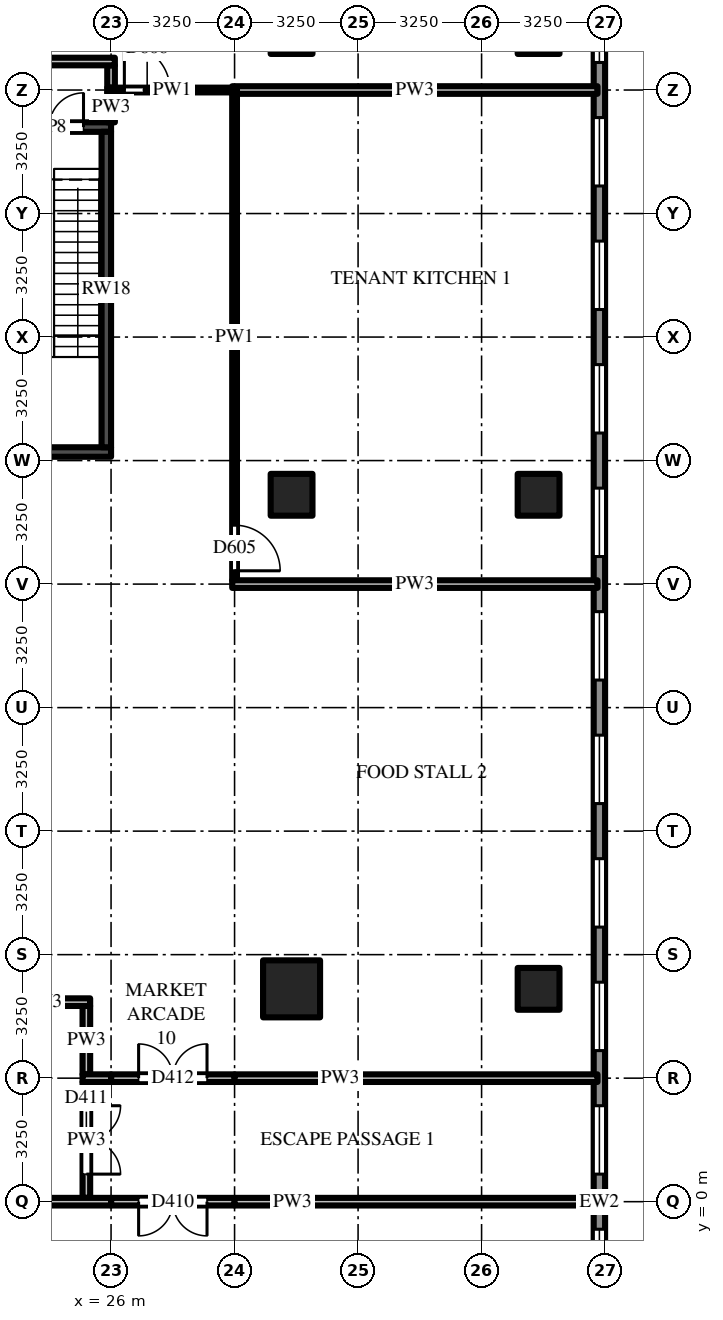
"""IFC4 building model, lengths in metres.
Left out: names, types, materials, properties, quantities, classifications, styles, units other than length and angle.
Written with IfcOpenShell. Run it as: python <this file> out.ifc"""

import sys

from ifc_helpers import new_model, si_unit, direction, frame, frame_2d, origin, origin_2d, place, context, subcontext, project, spatial, rectangle, extrude, source, transform, mapped, element, fill, save


model = new_model("IFC4")
c1 = context("Model", 3, precision=1e-05, world=origin(), true_north=direction((0.0, 1.0)))
c2 = subcontext(c1, "Body", "Model", "MODEL_VIEW")
j1 = project(units=[si_unit("LENGTHUNIT", "METRE"), si_unit("PLANEANGLEUNIT", "RADIAN")], contexts=[c1])
p1 = place(None, origin())
s1 = spatial("IfcSite", under=j1, at=p1, CompositionType="ELEMENT")
p2 = place(p1, origin())
s2 = spatial("IfcBuilding", under=s1, at=p2, CompositionType="ELEMENT")
p3 = place(p2, frame((0.0, 0.0, 19.0)))
s3 = spatial("IfcBuildingStorey", under=s2, at=p3, CompositionType="ELEMENT", Elevation=19.0)
m1 = source(origin(), c2, "Body", "SweptSolid", [
    extrude(rectangle(XDim=1.5, YDim=1.5, at=origin_2d()), origin(), (0.0, 0.0, 1.0), 5.0),
])
p4 = place(p3, frame((30.75, 5.6, 0.0), z_axis=(0.0, 0.0, 1.0), x_axis=(1.0, 0.0, 0.0)))
e1 = element("IfcColumn", 1, at=p4, inside=s3, PredefinedType="COLUMN", context=c2, shape_type="MappedRepresentation", body=[
    mapped(m1, transform((0.0, 0.0, 0.0))),
])
m2 = source(origin(), c2, "Body", "SweptSolid", [
    extrude(rectangle(XDim=1.1, YDim=1.1, at=origin_2d()), origin(), (0.0, 0.0, 1.0), 5.0),
])
for number, where, z_axis, x_axis in (
    (2, (30.75, 18.6, 0.0), (0.0, 0.0, 1.0), (1.0, 0.0, 0.0)),
    (3, (30.75, 30.75, 0.0), (0.0, 0.0, 1.0), (1.0, 0.0, 0.0)),
    (4, (37.25, 5.6, 0.0), (0.0, 0.0, 1.0), (1.0, 0.0, 0.0)),
    (5, (37.25, 18.6, 0.0), (0.0, 0.0, 1.0), (1.0, 0.0, 0.0)),
    (6, (37.25, 30.75, 0.0), (0.0, 0.0, 1.0), (1.0, 0.0, 0.0)),
):
    element("IfcColumn", number, at=place(p3, frame(where, z_axis=z_axis, x_axis=x_axis)), inside=s3, PredefinedType="COLUMN", context=c2, shape_type="MappedRepresentation", body=[
        mapped(m2, transform((0.0, 0.0, 0.0))),
    ])
m3 = source(origin(), c2, "Body", "SweptSolid", [
    extrude(rectangle(XDim=6.5, YDim=0.25, at=frame_2d((3.25, 0.0))), origin(), (0.0, 0.0, 1.0), 4.7),
])
p5 = place(p3, frame((19.5, 28.275, 0.0), z_axis=(0.0, 0.0, 1.0), x_axis=(1.0, 0.0, 0.0)))
e7 = element("IfcWall", 7, at=p5, inside=s3, PredefinedType="SHEAR", context=c2, shape_type="MappedRepresentation", body=[
    mapped(m3, transform((0.0, 0.0, 0.0))),
])
m4 = source(origin(), c2, "Body", "SweptSolid", [
    extrude(rectangle(XDim=1.8, YDim=2.1, at=frame_2d((0.9, 1.05))), frame((0.0, 0.135, 0.0), z_axis=(0.0, -1.0, 0.0), x_axis=(1.0, 0.0, 0.0)), (0.0, 0.0, 1.0), 0.27),
])
p6 = place(p5, frame((0.725, 0.0, 0.0)))
e8 = element("IfcOpeningElement", 8, at=p6, cuts=e7, PredefinedType="OPENING", context=c2, shape_type="MappedRepresentation", body=[
    mapped(m4, transform((0.0, 0.0, 0.0))),
])
p7 = place(p5, frame((3.975, 0.0, 0.0)))
e9 = element("IfcOpeningElement", 9, at=p7, cuts=e7, PredefinedType="OPENING", context=c2, shape_type="MappedRepresentation", body=[
    mapped(m4, transform((0.0, 0.0, 0.0))),
])
p8 = place(p3, frame((19.5, 19.725, 0.0), z_axis=(0.0, 0.0, 1.0), x_axis=(1.0, 0.0, 0.0)))
e10 = element("IfcWall", 10, at=p8, inside=s3, PredefinedType="SHEAR", context=c2, shape_type="MappedRepresentation", body=[
    mapped(m3, transform((0.0, 0.0, 0.0))),
])
m5 = source(origin(), c2, "Body", "SweptSolid", [
    extrude(rectangle(XDim=8.3, YDim=0.25, at=frame_2d((4.15, 0.0))), origin(), (0.0, 0.0, 1.0), 4.7),
])
p9 = place(p3, frame((25.875, 19.85, 0.0), z_axis=(0.0, 0.0, 1.0), x_axis=(0.0, 1.0, 0.0)))
e11 = element("IfcWall", 11, at=p9, inside=s3, PredefinedType="SHEAR", context=c2, shape_type="MappedRepresentation", body=[
    mapped(m5, transform((0.0, 0.0, 0.0))),
])
m6 = source(origin(), c2, "Body", "SweptSolid", [
    extrude(rectangle(XDim=71.5, YDim=0.3, at=frame_2d((35.75, 0.0))), origin(), (0.0, 0.0, 1.0), 4.7),
])
p10 = place(p3, frame((38.85, -35.75, 0.0), z_axis=(0.0, 0.0, 1.0), x_axis=(0.0, 1.0, 0.0)))
e12 = element("IfcWall", 12, at=p10, inside=s3, PredefinedType="SOLIDWALL", context=c2, shape_type="MappedRepresentation", body=[
    mapped(m6, transform((0.0, 0.0, 0.0))),
])
m7 = source(origin(), c2, "Body", "SweptSolid", [
    extrude(rectangle(XDim=1.8, YDim=3.0, at=frame_2d((0.9, 1.5))), frame((0.0, 0.16, 0.0), z_axis=(0.0, -1.0, 0.0), x_axis=(1.0, 0.0, 0.0)), (0.0, 0.0, 1.0), 0.32),
])
p11 = place(p10, frame((0.725, 0.0, 0.9)))
e13 = element("IfcOpeningElement", 13, at=p11, cuts=e12, PredefinedType="OPENING", context=c2, shape_type="MappedRepresentation", body=[
    mapped(m7, transform((0.0, 0.0, 0.0))),
])
p12 = place(p10, frame((3.975, 0.0, 0.9)))
e14 = element("IfcOpeningElement", 14, at=p12, cuts=e12, PredefinedType="OPENING", context=c2, shape_type="MappedRepresentation", body=[
    mapped(m7, transform((0.0, 0.0, 0.0))),
])
p13 = place(p10, frame((7.225, 0.0, 0.9)))
e15 = element("IfcOpeningElement", 15, at=p13, cuts=e12, PredefinedType="OPENING", context=c2, shape_type="MappedRepresentation", body=[
    mapped(m7, transform((0.0, 0.0, 0.0))),
])
p14 = place(p10, frame((10.475, 0.0, 0.9)))
e16 = element("IfcOpeningElement", 16, at=p14, cuts=e12, PredefinedType="OPENING", context=c2, shape_type="MappedRepresentation", body=[
    mapped(m7, transform((0.0, 0.0, 0.0))),
])
p15 = place(p10, frame((13.725, 0.0, 0.9)))
e17 = element("IfcOpeningElement", 17, at=p15, cuts=e12, PredefinedType="OPENING", context=c2, shape_type="MappedRepresentation", body=[
    mapped(m7, transform((0.0, 0.0, 0.0))),
])
p16 = place(p10, frame((16.975, 0.0, 0.9)))
e18 = element("IfcOpeningElement", 18, at=p16, cuts=e12, PredefinedType="OPENING", context=c2, shape_type="MappedRepresentation", body=[
    mapped(m7, transform((0.0, 0.0, 0.0))),
])
p17 = place(p10, frame((20.225, 0.0, 0.9)))
e19 = element("IfcOpeningElement", 19, at=p17, cuts=e12, PredefinedType="OPENING", context=c2, shape_type="MappedRepresentation", body=[
    mapped(m7, transform((0.0, 0.0, 0.0))),
])
p18 = place(p10, frame((23.475, 0.0, 0.9)))
e20 = element("IfcOpeningElement", 20, at=p18, cuts=e12, PredefinedType="OPENING", context=c2, shape_type="MappedRepresentation", body=[
    mapped(m7, transform((0.0, 0.0, 0.0))),
])
p19 = place(p10, frame((26.725, 0.0, 0.9)))
e21 = element("IfcOpeningElement", 21, at=p19, cuts=e12, PredefinedType="OPENING", context=c2, shape_type="MappedRepresentation", body=[
    mapped(m7, transform((0.0, 0.0, 0.0))),
])
p20 = place(p10, frame((29.975, 0.0, 0.9)))
e22 = element("IfcOpeningElement", 22, at=p20, cuts=e12, PredefinedType="OPENING", context=c2, shape_type="MappedRepresentation", body=[
    mapped(m7, transform((0.0, 0.0, 0.0))),
])
p21 = place(p10, frame((33.225, 0.0, 0.9)))
e23 = element("IfcOpeningElement", 23, at=p21, cuts=e12, PredefinedType="OPENING", context=c2, shape_type="MappedRepresentation", body=[
    mapped(m7, transform((0.0, 0.0, 0.0))),
])
p22 = place(p10, frame((36.475, 0.0, 0.9)))
e24 = element("IfcOpeningElement", 24, at=p22, cuts=e12, PredefinedType="OPENING", context=c2, shape_type="MappedRepresentation", body=[
    mapped(m7, transform((0.0, 0.0, 0.0))),
])
p23 = place(p10, frame((39.725, 0.0, 0.9)))
e25 = element("IfcOpeningElement", 25, at=p23, cuts=e12, PredefinedType="OPENING", context=c2, shape_type="MappedRepresentation", body=[
    mapped(m7, transform((0.0, 0.0, 0.0))),
])
p24 = place(p10, frame((42.975, 0.0, 0.9)))
e26 = element("IfcOpeningElement", 26, at=p24, cuts=e12, PredefinedType="OPENING", context=c2, shape_type="MappedRepresentation", body=[
    mapped(m7, transform((0.0, 0.0, 0.0))),
])
p25 = place(p10, frame((46.225, 0.0, 0.9)))
e27 = element("IfcOpeningElement", 27, at=p25, cuts=e12, PredefinedType="OPENING", context=c2, shape_type="MappedRepresentation", body=[
    mapped(m7, transform((0.0, 0.0, 0.0))),
])
p26 = place(p10, frame((49.475, 0.0, 0.9)))
e28 = element("IfcOpeningElement", 28, at=p26, cuts=e12, PredefinedType="OPENING", context=c2, shape_type="MappedRepresentation", body=[
    mapped(m7, transform((0.0, 0.0, 0.0))),
])
p27 = place(p10, frame((52.725, 0.0, 0.9)))
e29 = element("IfcOpeningElement", 29, at=p27, cuts=e12, PredefinedType="OPENING", context=c2, shape_type="MappedRepresentation", body=[
    mapped(m7, transform((0.0, 0.0, 0.0))),
])
p28 = place(p10, frame((55.975, 0.0, 0.9)))
e30 = element("IfcOpeningElement", 30, at=p28, cuts=e12, PredefinedType="OPENING", context=c2, shape_type="MappedRepresentation", body=[
    mapped(m7, transform((0.0, 0.0, 0.0))),
])
p29 = place(p10, frame((59.225, 0.0, 0.9)))
e31 = element("IfcOpeningElement", 31, at=p29, cuts=e12, PredefinedType="OPENING", context=c2, shape_type="MappedRepresentation", body=[
    mapped(m7, transform((0.0, 0.0, 0.0))),
])
p30 = place(p10, frame((62.475, 0.0, 0.9)))
e32 = element("IfcOpeningElement", 32, at=p30, cuts=e12, PredefinedType="OPENING", context=c2, shape_type="MappedRepresentation", body=[
    mapped(m7, transform((0.0, 0.0, 0.0))),
])
p31 = place(p10, frame((65.725, 0.0, 0.9)))
e33 = element("IfcOpeningElement", 33, at=p31, cuts=e12, PredefinedType="OPENING", context=c2, shape_type="MappedRepresentation", body=[
    mapped(m7, transform((0.0, 0.0, 0.0))),
])
p32 = place(p10, frame((68.975, 0.0, 0.9)))
e34 = element("IfcOpeningElement", 34, at=p32, cuts=e12, PredefinedType="OPENING", context=c2, shape_type="MappedRepresentation", body=[
    mapped(m7, transform((0.0, 0.0, 0.0))),
])
m8 = source(origin(), c2, "Body", "SweptSolid", [
    extrude(rectangle(XDim=3.05, YDim=0.2, at=frame_2d((1.525, 0.0))), origin(), (0.0, 0.0, 1.0), 4.077),
])
p33 = place(p3, frame((25.35, 3.15, 0.0), z_axis=(0.0, 0.0, 1.0), x_axis=(0.0, -1.0, 0.0)))
e35 = element("IfcWall", 35, at=p33, inside=s3, PredefinedType="PARTITIONING", context=c2, shape_type="MappedRepresentation", body=[
    mapped(m8, transform((0.0, 0.0, 0.0))),
])
m9 = source(origin(), c2, "Body", "SweptSolid", [
    extrude(rectangle(XDim=1.8, YDim=2.1, at=frame_2d((0.9, 1.05))), frame((0.0, 0.11, 0.0), z_axis=(0.0, -1.0, 0.0), x_axis=(1.0, 0.0, 0.0)), (0.0, 0.0, 1.0), 0.22),
])
p34 = place(p33, frame((0.625, 0.0, 0.0)))
e36 = element("IfcOpeningElement", 36, at=p34, cuts=e35, PredefinedType="OPENING", context=c2, shape_type="MappedRepresentation", body=[
    mapped(m9, transform((0.0, 0.0, 0.0))),
])
m10 = source(origin(), c2, "Body", "SweptSolid", [
    extrude(rectangle(XDim=1.8, YDim=0.2, at=frame_2d((0.9, 0.0))), origin(), (0.0, 0.0, 1.0), 4.7),
])
p35 = place(p3, frame((25.35, 3.35, 0.0), z_axis=(0.0, 0.0, 1.0), x_axis=(0.0, 1.0, 0.0)))
e37 = element("IfcWall", 37, at=p35, inside=s3, PredefinedType="PARTITIONING", context=c2, shape_type="MappedRepresentation", body=[
    mapped(m10, transform((0.0, 0.0, 0.0))),
])
m11 = source(origin(), c2, "Body", "SweptSolid", [
    extrude(rectangle(XDim=0.788, YDim=0.2, at=frame_2d((0.394, 0.0))), origin(), (0.0, 0.0, 1.0), 4.7),
])
p36 = place(p3, frame((26.0, 28.4, 0.0), z_axis=(0.0, 0.0, 1.0), x_axis=(0.0, 1.0, 0.0)))
e38 = element("IfcWall", 38, at=p36, inside=s3, PredefinedType="PARTITIONING", context=c2, shape_type="MappedRepresentation", body=[
    mapped(m11, transform((0.0, 0.0, 0.0))),
])
m12 = source(origin(), c2, "Body", "SweptSolid", [
    extrude(rectangle(XDim=0.587, YDim=0.2, at=frame_2d((0.294, 0.0))), origin(), (0.0, 0.0, 1.0), 4.7),
])
p37 = place(p3, frame((26.0, 29.9, 0.0), z_axis=(0.0, 0.0, 1.0), x_axis=(0.0, -1.0, 0.0)))
e39 = element("IfcWall", 39, at=p37, inside=s3, PredefinedType="PARTITIONING", context=c2, shape_type="MappedRepresentation", body=[
    mapped(m12, transform((0.0, 0.0, 0.0))),
])
m13 = source(origin(), c2, "Body", "SweptSolid", [
    extrude(rectangle(XDim=12.8, YDim=0.125, at=frame_2d((6.4, 0.0))), origin(), (0.0, 0.0, 1.0), 3.762),
])
p38 = place(p3, frame((29.25, 29.15, 0.0), z_axis=(0.0, 0.0, 1.0), x_axis=(0.0, -1.0, 0.0)))
e40 = element("IfcWall", 40, at=p38, inside=s3, PredefinedType="PARTITIONING", context=c2, shape_type="MappedRepresentation", body=[
    mapped(m13, transform((0.0, 0.0, 0.0))),
])
m14 = source(origin(), c2, "Body", "SweptSolid", [
    extrude(rectangle(XDim=1.2, YDim=2.1, at=frame_2d((0.6, 1.05))), frame((0.0, 0.073, 0.0), z_axis=(0.0, -1.0, 0.0), x_axis=(1.0, 0.0, 0.0)), (0.0, 0.0, 1.0), 0.145),
])
p39 = place(p38, frame((11.35, 0.0, 0.0)))
e41 = element("IfcOpeningElement", 41, at=p39, cuts=e40, PredefinedType="OPENING", context=c2, shape_type="MappedRepresentation", body=[
    mapped(m14, transform((0.0, 0.0, 0.0))),
])
m15 = source(origin(), c2, "Body", "SweptSolid", [
    extrude(rectangle(XDim=3.25, YDim=0.2, at=frame_2d((1.625, 0.0))), origin(), (0.0, 0.0, 1.0), 4.077),
])
p40 = place(p3, frame((29.25, 0.0, 0.0), z_axis=(0.0, 0.0, 1.0), x_axis=(-1.0, 0.0, 0.0)))
e42 = element("IfcWall", 42, at=p40, inside=s3, PredefinedType="PARTITIONING", context=c2, shape_type="MappedRepresentation", body=[
    mapped(m15, transform((0.0, 0.0, 0.0))),
])
p41 = place(p40, frame((0.725, 0.0, 0.0)))
e43 = element("IfcOpeningElement", 43, at=p41, cuts=e42, PredefinedType="OPENING", context=c2, shape_type="MappedRepresentation", body=[
    mapped(m9, transform((0.0, 0.0, 0.0))),
])
m16 = source(origin(), c2, "Body", "SweptSolid", [
    extrude(rectangle(XDim=2.0, YDim=0.2, at=frame_2d((1.0, 0.0))), origin(), (0.0, 0.0, 1.0), 4.077),
])
p42 = place(p3, frame((26.0, 0.0, 0.0), z_axis=(0.0, 0.0, 1.0), x_axis=(-1.0, 0.0, 0.0)))
e44 = element("IfcWall", 44, at=p42, inside=s3, PredefinedType="PARTITIONING", context=c2, shape_type="MappedRepresentation", body=[
    mapped(m16, transform((0.0, 0.0, 0.0))),
])
m17 = source(origin(), c2, "Body", "SweptSolid", [
    extrude(rectangle(XDim=9.55, YDim=0.2, at=frame_2d((4.775, 0.0))), origin(), (0.0, 0.0, 1.0), 3.918),
])
p43 = place(p3, frame((38.8, 0.0, 0.0), z_axis=(0.0, 0.0, 1.0), x_axis=(-1.0, 0.0, 0.0)))
e45 = element("IfcWall", 45, at=p43, inside=s3, PredefinedType="PARTITIONING", context=c2, shape_type="MappedRepresentation", body=[
    mapped(m17, transform((0.0, 0.0, 0.0))),
])
m18 = source(origin(), c2, "Body", "SweptSolid", [
    extrude(rectangle(XDim=3.25, YDim=0.2, at=frame_2d((1.625, 0.0))), origin(), (0.0, 0.0, 1.0), 4.7),
])
p44 = place(p3, frame((26.0, 3.25, 0.0), z_axis=(0.0, 0.0, 1.0), x_axis=(1.0, 0.0, 0.0)))
e46 = element("IfcWall", 46, at=p44, inside=s3, PredefinedType="PARTITIONING", context=c2, shape_type="MappedRepresentation", body=[
    mapped(m18, transform((0.0, 0.0, 0.0))),
])
p45 = place(p44, frame((0.725, 0.0, 0.0)))
e47 = element("IfcOpeningElement", 47, at=p45, cuts=e46, PredefinedType="OPENING", context=c2, shape_type="MappedRepresentation", body=[
    mapped(m9, transform((0.0, 0.0, 0.0))),
])
m19 = source(origin(), c2, "Body", "SweptSolid", [
    extrude(rectangle(XDim=0.75, YDim=0.2, at=frame_2d((0.375, 0.0))), origin(), (0.0, 0.0, 1.0), 4.7),
])
p46 = place(p3, frame((25.25, 3.25, 0.0), z_axis=(0.0, 0.0, 1.0), x_axis=(1.0, 0.0, 0.0)))
e48 = element("IfcWall", 48, at=p46, inside=s3, PredefinedType="PARTITIONING", context=c2, shape_type="MappedRepresentation", body=[
    mapped(m19, transform((0.0, 0.0, 0.0))),
])
p47 = place(p3, frame((29.25, 3.25, 0.0), z_axis=(0.0, 0.0, 1.0), x_axis=(1.0, 0.0, 0.0)))
e49 = element("IfcWall", 49, at=p47, inside=s3, PredefinedType="PARTITIONING", context=c2, shape_type="MappedRepresentation", body=[
    mapped(m17, transform((0.0, 0.0, 0.0))),
])
m20 = source(origin(), c2, "Body", "SweptSolid", [
    extrude(rectangle(XDim=1.45, YDim=0.2, at=frame_2d((0.725, 0.0))), origin(), (0.0, 0.0, 1.0), 4.7),
])
p48 = place(p3, frame((24.0, 5.25, 0.0), z_axis=(0.0, 0.0, 1.0), x_axis=(1.0, 0.0, 0.0)))
e50 = element("IfcWall", 50, at=p48, inside=s3, PredefinedType="PARTITIONING", context=c2, shape_type="MappedRepresentation", body=[
    mapped(m20, transform((0.0, 0.0, 0.0))),
])
m21 = source(origin(), c2, "Body", "SweptSolid", [
    extrude(rectangle(XDim=9.613, YDim=0.2, at=frame_2d((4.806, 0.0))), origin(), (0.0, 0.0, 1.0), 3.762),
])
for number, where, z_axis, x_axis in (
    (51, (29.188, 16.25, 0.0), (0.0, 0.0, 1.0), (1.0, 0.0, 0.0)),
    (52, (29.188, 29.25, 0.0), (0.0, 0.0, 1.0), (1.0, 0.0, 0.0)),
):
    element("IfcWall", number, at=place(p3, frame(where, z_axis=z_axis, x_axis=x_axis)), inside=s3, PredefinedType="PARTITIONING", context=c2, shape_type="MappedRepresentation", body=[
        mapped(m21, transform((0.0, 0.0, 0.0))),
    ])
m22 = source(origin(), c2, "Body", "SweptSolid", [
    extrude(rectangle(XDim=3.413, YDim=0.125, at=frame_2d((1.706, 0.0))), origin(), (0.0, 0.0, 1.0), 4.7),
])
p49 = place(p3, frame((25.9, 29.25, 0.0), z_axis=(0.0, 0.0, 1.0), x_axis=(1.0, 0.0, 0.0)))
e53 = element("IfcWall", 53, at=p49, inside=s3, PredefinedType="PARTITIONING", context=c2, shape_type="MappedRepresentation", body=[
    mapped(m22, transform((0.0, 0.0, 0.0))),
])
p50 = place(p49, frame((0.45, 0.0, 0.0)))
e54 = element("IfcOpeningElement", 54, at=p50, cuts=e53, PredefinedType="OPENING", context=c2, shape_type="MappedRepresentation", body=[
    mapped(m14, transform((0.0, 0.0, 0.0))),
])
m23 = source(origin(), c2, "Body", "SweptSolid", [
    extrude(rectangle(XDim=8.2, YDim=0.2, at=frame_2d((4.1, 0.0))), origin(), (0.0, 0.0, 1.0), 3.762),
])
p51 = place(p3, frame((17.9, 30.0, 0.0), z_axis=(0.0, 0.0, 1.0), x_axis=(1.0, 0.0, 0.0)))
e55 = element("IfcWall", 55, at=p51, inside=s3, PredefinedType="PARTITIONING", context=c2, shape_type="MappedRepresentation", body=[
    mapped(m23, transform((0.0, 0.0, 0.0))),
])
m24 = source(origin(), c2, "Body", "SweptSolid", [
    extrude(rectangle(XDim=1.8, YDim=2.1, at=frame_2d((0.9, 1.05))), frame((0.0, 0.025, 0.0), z_axis=(0.0, -1.0, 0.0), x_axis=(1.0, 0.0, 0.0)), (0.0, 0.0, 1.0), 0.05),
])
p52 = place(p7, origin())
e56 = element("IfcDoor", 56, at=p52, inside=s3, OperationType="DOUBLE_DOOR_SINGLE_SWING", PredefinedType="DOOR", context=c2, shape_type="MappedRepresentation", body=[
    mapped(m24, transform((0.0, 0.0, 0.0))),
])
fill(e9, e56)
m25 = source(origin(), c2, "Body", "SweptSolid", [
    extrude(rectangle(XDim=1.8, YDim=3.0, at=frame_2d((0.9, 1.5))), frame((0.0, 0.03, 0.0), z_axis=(0.0, -1.0, 0.0), x_axis=(1.0, 0.0, 0.0)), (0.0, 0.0, 1.0), 0.06),
])
p53 = place(p21, origin())
e57 = element("IfcWindow", 57, at=p53, inside=s3, PartitioningType="SINGLE_PANEL", PredefinedType="WINDOW", context=c2, shape_type="MappedRepresentation", body=[
    mapped(m25, transform((0.0, 0.0, 0.0))),
])
fill(e23, e57)
p54 = place(p22, origin())
e58 = element("IfcWindow", 58, at=p54, inside=s3, PartitioningType="SINGLE_PANEL", PredefinedType="WINDOW", context=c2, shape_type="MappedRepresentation", body=[
    mapped(m25, transform((0.0, 0.0, 0.0))),
])
fill(e24, e58)
p55 = place(p23, origin())
e59 = element("IfcWindow", 59, at=p55, inside=s3, PartitioningType="SINGLE_PANEL", PredefinedType="WINDOW", context=c2, shape_type="MappedRepresentation", body=[
    mapped(m25, transform((0.0, 0.0, 0.0))),
])
fill(e25, e59)
p56 = place(p24, origin())
e60 = element("IfcWindow", 60, at=p56, inside=s3, PartitioningType="SINGLE_PANEL", PredefinedType="WINDOW", context=c2, shape_type="MappedRepresentation", body=[
    mapped(m25, transform((0.0, 0.0, 0.0))),
])
fill(e26, e60)
p57 = place(p25, origin())
e61 = element("IfcWindow", 61, at=p57, inside=s3, PartitioningType="SINGLE_PANEL", PredefinedType="WINDOW", context=c2, shape_type="MappedRepresentation", body=[
    mapped(m25, transform((0.0, 0.0, 0.0))),
])
fill(e27, e61)
p58 = place(p26, origin())
e62 = element("IfcWindow", 62, at=p58, inside=s3, PartitioningType="SINGLE_PANEL", PredefinedType="WINDOW", context=c2, shape_type="MappedRepresentation", body=[
    mapped(m25, transform((0.0, 0.0, 0.0))),
])
fill(e28, e62)
p59 = place(p27, origin())
e63 = element("IfcWindow", 63, at=p59, inside=s3, PartitioningType="SINGLE_PANEL", PredefinedType="WINDOW", context=c2, shape_type="MappedRepresentation", body=[
    mapped(m25, transform((0.0, 0.0, 0.0))),
])
fill(e29, e63)
p60 = place(p28, origin())
e64 = element("IfcWindow", 64, at=p60, inside=s3, PartitioningType="SINGLE_PANEL", PredefinedType="WINDOW", context=c2, shape_type="MappedRepresentation", body=[
    mapped(m25, transform((0.0, 0.0, 0.0))),
])
fill(e30, e64)
p61 = place(p29, origin())
e65 = element("IfcWindow", 65, at=p61, inside=s3, PartitioningType="SINGLE_PANEL", PredefinedType="WINDOW", context=c2, shape_type="MappedRepresentation", body=[
    mapped(m25, transform((0.0, 0.0, 0.0))),
])
fill(e31, e65)
p62 = place(p30, origin())
e66 = element("IfcWindow", 66, at=p62, inside=s3, PartitioningType="SINGLE_PANEL", PredefinedType="WINDOW", context=c2, shape_type="MappedRepresentation", body=[
    mapped(m25, transform((0.0, 0.0, 0.0))),
])
fill(e32, e66)
p63 = place(p31, origin())
e67 = element("IfcWindow", 67, at=p63, inside=s3, PartitioningType="SINGLE_PANEL", PredefinedType="WINDOW", context=c2, shape_type="MappedRepresentation", body=[
    mapped(m25, transform((0.0, 0.0, 0.0))),
])
fill(e33, e67)
p64 = place(p41, origin())
e68 = element("IfcDoor", 68, at=p64, inside=s3, OperationType="DOUBLE_DOOR_SINGLE_SWING", PredefinedType="DOOR", context=c2, shape_type="MappedRepresentation", body=[
    mapped(m24, transform((0.0, 0.0, 0.0))),
])
fill(e43, e68)
p65 = place(p34, origin())
e69 = element("IfcDoor", 69, at=p65, inside=s3, OperationType="DOUBLE_DOOR_SINGLE_SWING", PredefinedType="DOOR", context=c2, shape_type="MappedRepresentation", body=[
    mapped(m24, transform((0.0, 0.0, 0.0))),
])
fill(e36, e69)
p66 = place(p45, origin())
e70 = element("IfcDoor", 70, at=p66, inside=s3, OperationType="DOUBLE_DOOR_SINGLE_SWING", PredefinedType="DOOR", context=c2, shape_type="MappedRepresentation", body=[
    mapped(m24, transform((0.0, 0.0, 0.0))),
])
fill(e47, e70)
m26 = source(origin(), c2, "Body", "SweptSolid", [
    extrude(rectangle(XDim=1.2, YDim=2.1, at=frame_2d((0.6, 1.05))), frame((0.0, 0.025, 0.0), z_axis=(0.0, -1.0, 0.0), x_axis=(1.0, 0.0, 0.0)), (0.0, 0.0, 1.0), 0.05),
])
p67 = place(p39, origin())
e71 = element("IfcDoor", 71, at=p67, inside=s3, OperationType="SINGLE_SWING_RIGHT", PredefinedType="DOOR", context=c2, shape_type="MappedRepresentation", body=[
    mapped(m26, transform((0.0, 0.0, 0.0))),
])
fill(e41, e71)
p68 = place(p50, origin())
e72 = element("IfcDoor", 72, at=p68, inside=s3, OperationType="SINGLE_SWING_LEFT", PredefinedType="DOOR", context=c2, shape_type="MappedRepresentation", body=[
    mapped(m26, transform((0.0, 0.0, 0.0))),
])
fill(e54, e72)
save(model, sys.argv[1])
